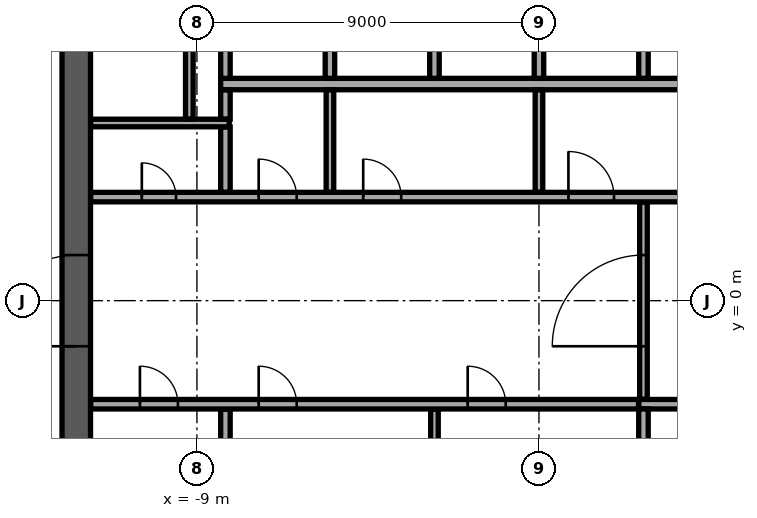
"""IFC4 building model, lengths in metres.
Left out: names, types, materials, properties, quantities, classifications, styles, units other than length and angle.
Written with IfcOpenShell. Run it as: python <this file> out.ifc"""

import sys

from ifc_helpers import new_model, si_unit, direction, frame, frame_2d, origin, place, context, subcontext, project, spatial, rectangle, extrude, element, fill, save


model = new_model("IFC4")
c1 = context("Model", 3, precision=1e-05, world=origin(), true_north=direction((0.0, 1.0)))
c2 = subcontext(c1, "Body", "Model", "MODEL_VIEW")
j1 = project(units=[si_unit("LENGTHUNIT", "METRE"), si_unit("PLANEANGLEUNIT", "RADIAN")], contexts=[c1])
p1 = place(None, origin())
s1 = spatial("IfcSite", under=j1, at=p1, CompositionType="ELEMENT")
p2 = place(p1, origin())
s2 = spatial("IfcBuilding", under=s1, at=p2, CompositionType="ELEMENT")
p3 = place(p2, frame((0.0, 0.0, 242.9)))
s3 = spatial("IfcBuildingStorey", under=s2, at=p3, CompositionType="ELEMENT", Elevation=242.9)
p4 = place(p3, frame((-12.175, -11.8, 0.0), z_axis=(0.0, 0.0, 1.0), x_axis=(0.0, 1.0, 0.0)))
e1 = element("IfcWall", 1, at=p4, inside=s3, PredefinedType="SHEAR", context=c2, shape_type="SweptSolid", body=[
    extrude(rectangle(XDim=23.6, YDim=0.75, at=frame_2d((11.8, 0.0))), origin(), (0.0, 0.0, 1.0), 3.64),
])
p5 = place(p4, frame((10.6, 0.0, 0.0)))
e2 = element("IfcOpeningElement", 2, at=p5, cuts=e1, PredefinedType="OPENING", context=c2, shape_type="SweptSolid", body=[
    extrude(rectangle(XDim=2.4, YDim=2.4, at=frame_2d((1.2, 1.2))), frame((0.0, 0.385, 0.0), z_axis=(0.0, -1.0, 0.0), x_axis=(1.0, 0.0, 0.0)), (0.0, 0.0, 1.0), 0.77),
])
p6 = place(p3, frame((-8.375, 5.7, 0.0), z_axis=(0.0, 0.0, 1.0), x_axis=(1.0, 0.0, 0.0)))
e3 = element("IfcWall", 3, at=p6, inside=s3, PredefinedType="SOLIDWALL", context=c2, shape_type="SweptSolid", body=[
    extrude(rectangle(XDim=16.75, YDim=0.3, at=frame_2d((8.375, 0.0))), origin(), (0.0, 0.0, 1.0), 3.64),
])
for number, where, z_axis, x_axis in (
    (4, (-8.25, 5.85, 0.0), (0.0, 0.0, 1.0), (0.0, 1.0, 0.0)),
    (5, (-5.5, 5.85, 0.0), (0.0, 0.0, 1.0), (0.0, 1.0, 0.0)),
    (6, (-2.75, 5.85, 0.0), (0.0, 0.0, 1.0), (0.0, 1.0, 0.0)),
    (7, (0.0, 5.85, 0.0), (0.0, 0.0, 1.0), (0.0, 1.0, 0.0)),
    (8, (2.75, 5.85, 0.0), (0.0, 0.0, 1.0), (0.0, 1.0, 0.0)),
):
    element("IfcWall", number, at=place(p3, frame(where, z_axis=z_axis, x_axis=x_axis)), inside=s3, PredefinedType="SOLIDWALL", context=c2, shape_type="SweptSolid", body=[
        extrude(rectangle(XDim=2.7, YDim=0.25, at=frame_2d((1.35, 0.0))), origin(), (0.0, 0.0, 1.0), 3.64),
    ])
p7 = place(p3, frame((2.625, -2.725, 0.0), z_axis=(0.0, 0.0, 1.0), x_axis=(1.0, 0.0, 0.0)))
e9 = element("IfcWall", 9, at=p7, inside=s3, PredefinedType="SOLIDWALL", context=c2, shape_type="SweptSolid", body=[
    extrude(rectangle(XDim=3.0, YDim=0.25, at=frame_2d((1.5, 0.0))), origin(), (0.0, 0.0, 1.0), 3.64),
])
p8 = place(p3, frame((2.75, -5.55, 0.0), z_axis=(0.0, 0.0, 1.0), x_axis=(0.0, 1.0, 0.0)))
e10 = element("IfcWall", 10, at=p8, inside=s3, PredefinedType="SOLIDWALL", context=c2, shape_type="SweptSolid", body=[
    extrude(rectangle(XDim=2.7, YDim=0.25, at=frame_2d((1.35, 0.0))), origin(), (0.0, 0.0, 1.0), 3.64),
])
p9 = place(p3, frame((-8.25, -5.545, 0.0), z_axis=(0.0, 0.0, 1.0), x_axis=(0.0, 1.0, 0.0)))
e11 = element("IfcWall", 11, at=p9, inside=s3, PredefinedType="PARTITIONING", context=c2, shape_type="SweptSolid", body=[
    extrude(rectangle(XDim=2.69, YDim=0.25, at=frame_2d((1.345, 0.0))), origin(), (0.0, 0.0, 1.0), 3.64),
])
p10 = place(p3, frame((-2.75, -5.545, 0.0), z_axis=(0.0, 0.0, 1.0), x_axis=(0.0, 1.0, 0.0)))
e12 = element("IfcWall", 12, at=p10, inside=s3, PredefinedType="PARTITIONING", context=c2, shape_type="SweptSolid", body=[
    extrude(rectangle(XDim=2.69, YDim=0.2, at=frame_2d((1.345, 0.0))), origin(), (0.0, 0.0, 1.0), 3.64),
])
p11 = place(p3, frame((-11.795, -2.725, 0.0), z_axis=(0.0, 0.0, 1.0), x_axis=(1.0, 0.0, 0.0)))
e13 = element("IfcWall", 13, at=p11, inside=s3, PredefinedType="PARTITIONING", context=c2, shape_type="SweptSolid", body=[
    extrude(rectangle(XDim=14.415, YDim=0.25, at=frame_2d((7.208, 0.0))), origin(), (0.0, 0.0, 1.0), 3.64),
])
p12 = place(p11, frame((1.295, 0.0, 0.0)))
e14 = element("IfcOpeningElement", 14, at=p12, cuts=e13, PredefinedType="OPENING", context=c2, shape_type="SweptSolid", body=[
    extrude(rectangle(XDim=1.0, YDim=2.1, at=frame_2d((0.5, 1.05))), frame((0.0, 0.135, 0.0), z_axis=(0.0, -1.0, 0.0), x_axis=(1.0, 0.0, 0.0)), (0.0, 0.0, 1.0), 0.27),
])
p13 = place(p11, frame((4.42, 0.0, 0.0)))
e15 = element("IfcOpeningElement", 15, at=p13, cuts=e13, PredefinedType="OPENING", context=c2, shape_type="SweptSolid", body=[
    extrude(rectangle(XDim=1.0, YDim=2.1, at=frame_2d((0.5, 1.05))), frame((0.0, 0.135, 0.0), z_axis=(0.0, -1.0, 0.0), x_axis=(1.0, 0.0, 0.0)), (0.0, 0.0, 1.0), 0.27),
])
p14 = place(p11, frame((9.92, 0.0, 0.0)))
e16 = element("IfcOpeningElement", 16, at=p14, cuts=e13, PredefinedType="OPENING", context=c2, shape_type="SweptSolid", body=[
    extrude(rectangle(XDim=1.0, YDim=2.1, at=frame_2d((0.5, 1.05))), frame((0.0, 0.135, 0.0), z_axis=(0.0, -1.0, 0.0), x_axis=(1.0, 0.0, 0.0)), (0.0, 0.0, 1.0), 0.27),
])
p15 = place(p3, frame((2.75, -2.595, 0.0), z_axis=(0.0, 0.0, 1.0), x_axis=(0.0, 1.0, 0.0)))
e17 = element("IfcWall", 17, at=p15, inside=s3, PredefinedType="PARTITIONING", context=c2, shape_type="SweptSolid", body=[
    extrude(rectangle(XDim=5.19, YDim=0.2, at=frame_2d((2.595, 0.0))), origin(), (0.0, 0.0, 1.0), 3.64),
])
p16 = place(p15, frame((1.395, 0.0, 0.0)))
e18 = element("IfcOpeningElement", 18, at=p16, cuts=e17, PredefinedType="OPENING", context=c2, shape_type="SweptSolid", body=[
    extrude(rectangle(XDim=2.4, YDim=2.4, at=frame_2d((1.2, 1.2))), frame((0.0, 0.11, 0.0), z_axis=(0.0, -1.0, 0.0), x_axis=(1.0, 0.0, 0.0)), (0.0, 0.0, 1.0), 0.22),
])
p17 = place(p3, frame((-11.795, 2.725, 0.0), z_axis=(0.0, 0.0, 1.0), x_axis=(1.0, 0.0, 0.0)))
e19 = element("IfcWall", 19, at=p17, inside=s3, PredefinedType="PARTITIONING", context=c2, shape_type="SweptSolid", body=[
    extrude(rectangle(XDim=23.59, YDim=0.25, at=frame_2d((11.795, 0.0))), origin(), (0.0, 0.0, 1.0), 3.64),
])
p18 = place(p17, frame((21.345, 0.0, 0.0)))
e20 = element("IfcOpeningElement", 20, at=p18, cuts=e19, PredefinedType="OPENING", context=c2, shape_type="SweptSolid", body=[
    extrude(rectangle(XDim=0.9, YDim=2.1, at=frame_2d((0.45, 1.05))), frame((0.0, 0.135, 0.0), z_axis=(0.0, -1.0, 0.0), x_axis=(1.0, 0.0, 0.0)), (0.0, 0.0, 1.0), 0.27),
])
p19 = place(p17, frame((1.345, 0.0, 0.0)))
e21 = element("IfcOpeningElement", 21, at=p19, cuts=e19, PredefinedType="OPENING", context=c2, shape_type="SweptSolid", body=[
    extrude(rectangle(XDim=0.9, YDim=2.1, at=frame_2d((0.45, 1.05))), frame((0.0, 0.135, 0.0), z_axis=(0.0, -1.0, 0.0), x_axis=(1.0, 0.0, 0.0)), (0.0, 0.0, 1.0), 0.27),
])
p20 = place(p17, frame((4.42, 0.0, 0.0)))
e22 = element("IfcOpeningElement", 22, at=p20, cuts=e19, PredefinedType="OPENING", context=c2, shape_type="SweptSolid", body=[
    extrude(rectangle(XDim=1.0, YDim=2.1, at=frame_2d((0.5, 1.05))), frame((0.0, 0.135, 0.0), z_axis=(0.0, -1.0, 0.0), x_axis=(1.0, 0.0, 0.0)), (0.0, 0.0, 1.0), 0.27),
])
p21 = place(p17, frame((7.17, 0.0, 0.0)))
e23 = element("IfcOpeningElement", 23, at=p21, cuts=e19, PredefinedType="OPENING", context=c2, shape_type="SweptSolid", body=[
    extrude(rectangle(XDim=1.0, YDim=2.1, at=frame_2d((0.5, 1.05))), frame((0.0, 0.135, 0.0), z_axis=(0.0, -1.0, 0.0), x_axis=(1.0, 0.0, 0.0)), (0.0, 0.0, 1.0), 0.27),
])
p22 = place(p17, frame((12.57, 0.0, 0.0)))
e24 = element("IfcOpeningElement", 24, at=p22, cuts=e19, PredefinedType="OPENING", context=c2, shape_type="SweptSolid", body=[
    extrude(rectangle(XDim=1.2, YDim=2.1, at=frame_2d((0.6, 1.05))), frame((0.0, 0.135, 0.0), z_axis=(0.0, -1.0, 0.0), x_axis=(1.0, 0.0, 0.0)), (0.0, 0.0, 1.0), 0.27),
])
p23 = place(p3, frame((-8.25, 2.855, 0.0), z_axis=(0.0, 0.0, 1.0), x_axis=(0.0, 1.0, 0.0)))
e25 = element("IfcWall", 25, at=p23, inside=s3, PredefinedType="PARTITIONING", context=c2, shape_type="SweptSolid", body=[
    extrude(rectangle(XDim=1.715, YDim=0.25, at=frame_2d((0.857, 0.0))), origin(), (0.0, 0.0, 1.0), 3.64),
])
for number, where, z_axis, x_axis in (
    (26, (-5.5, 2.855, 0.0), (0.0, 0.0, 1.0), (0.0, 1.0, 0.0)),
    (27, (0.0, 2.855, 0.0), (0.0, 0.0, 1.0), (0.0, 1.0, 0.0)),
):
    element("IfcWall", number, at=place(p3, frame(where, z_axis=z_axis, x_axis=x_axis)), inside=s3, PredefinedType="PARTITIONING", context=c2, shape_type="SweptSolid", body=[
        extrude(rectangle(XDim=2.69, YDim=0.2, at=frame_2d((1.345, 0.0))), origin(), (0.0, 0.0, 1.0), 3.64),
    ])
p24 = place(p3, frame((-11.795, 4.675, 0.0), z_axis=(0.0, 0.0, 1.0), x_axis=(1.0, 0.0, 0.0)))
e28 = element("IfcWall", 28, at=p24, inside=s3, PredefinedType="PARTITIONING", context=c2, shape_type="SweptSolid", body=[
    extrude(rectangle(XDim=3.645, YDim=0.2, at=frame_2d((1.823, 0.0))), origin(), (0.0, 0.0, 1.0), 3.64),
])
p25 = place(p3, frame((-9.2, 4.78, 0.0), z_axis=(0.0, 0.0, 1.0), x_axis=(0.0, 1.0, 0.0)))
e29 = element("IfcWall", 29, at=p25, inside=s3, PredefinedType="PARTITIONING", context=c2, shape_type="SweptSolid", body=[
    extrude(rectangle(XDim=7.015, YDim=0.2, at=frame_2d((3.507, 0.0))), origin(), (0.0, 0.0, 1.0), 3.64),
])
p26 = place(p25, frame((2.92, 0.0, 0.0)))
e30 = element("IfcOpeningElement", 30, at=p26, cuts=e29, PredefinedType="OPENING", context=c2, shape_type="SweptSolid", body=[
    extrude(rectangle(XDim=1.0, YDim=2.1, at=frame_2d((0.5, 1.05))), frame((0.0, 0.11, 0.0), z_axis=(0.0, -1.0, 0.0), x_axis=(1.0, 0.0, 0.0)), (0.0, 0.0, 1.0), 0.22),
])
p27 = place(p3, frame((-8.25, 4.78, 0.0), z_axis=(0.0, 0.0, 1.0), x_axis=(0.0, 1.0, 0.0)))
e31 = element("IfcWall", 31, at=p27, inside=s3, PredefinedType="PARTITIONING", context=c2, shape_type="SweptSolid", body=[
    extrude(rectangle(XDim=0.765, YDim=0.25, at=frame_2d((0.382, 0.0))), origin(), (0.0, 0.0, 1.0), 3.64),
])
p28 = place(p3, frame((-5.115, 33.491, 0.0), z_axis=(0.0, 0.0, 1.0), x_axis=(-0.57357740375, -0.819151366908, 0.0)))
e32 = element("IfcWall", 32, at=p28, inside=s3, PredefinedType="STANDARD", context=c2, shape_type="SweptSolid", body=[
    extrude(rectangle(XDim=48.843, YDim=0.6, at=frame_2d((24.422, 0.0))), origin(), (0.0, 0.0, 1.0), 3.64),
])
p29 = place(p28, frame((1.22, 0.0, 0.9)))
e33 = element("IfcOpeningElement", 33, at=p29, cuts=e32, PredefinedType="OPENING", context=c2, shape_type="SweptSolid", body=[
    extrude(rectangle(XDim=2.0, YDim=2.1, at=frame_2d((1.0, 1.05))), frame((0.0, 0.31, 0.0), z_axis=(0.0, -1.0, 0.0), x_axis=(1.0, 0.0, 0.0)), (0.0, 0.0, 1.0), 0.62),
])
p30 = place(p28, frame((5.66, 0.0, 0.9)))
e34 = element("IfcOpeningElement", 34, at=p30, cuts=e32, PredefinedType="OPENING", context=c2, shape_type="SweptSolid", body=[
    extrude(rectangle(XDim=2.0, YDim=2.1, at=frame_2d((1.0, 1.05))), frame((0.0, 0.31, 0.0), z_axis=(0.0, -1.0, 0.0), x_axis=(1.0, 0.0, 0.0)), (0.0, 0.0, 1.0), 0.62),
])
p31 = place(p28, frame((10.101, 0.0, 0.9)))
e35 = element("IfcOpeningElement", 35, at=p31, cuts=e32, PredefinedType="OPENING", context=c2, shape_type="SweptSolid", body=[
    extrude(rectangle(XDim=2.0, YDim=2.1, at=frame_2d((1.0, 1.05))), frame((0.0, 0.31, 0.0), z_axis=(0.0, -1.0, 0.0), x_axis=(1.0, 0.0, 0.0)), (0.0, 0.0, 1.0), 0.62),
])
p32 = place(p28, frame((14.541, 0.0, 0.9)))
e36 = element("IfcOpeningElement", 36, at=p32, cuts=e32, PredefinedType="OPENING", context=c2, shape_type="SweptSolid", body=[
    extrude(rectangle(XDim=2.0, YDim=2.1, at=frame_2d((1.0, 1.05))), frame((0.0, 0.31, 0.0), z_axis=(0.0, -1.0, 0.0), x_axis=(1.0, 0.0, 0.0)), (0.0, 0.0, 1.0), 0.62),
])
p33 = place(p28, frame((18.981, 0.0, 0.9)))
e37 = element("IfcOpeningElement", 37, at=p33, cuts=e32, PredefinedType="OPENING", context=c2, shape_type="SweptSolid", body=[
    extrude(rectangle(XDim=2.0, YDim=2.1, at=frame_2d((1.0, 1.05))), frame((0.0, 0.31, 0.0), z_axis=(0.0, -1.0, 0.0), x_axis=(1.0, 0.0, 0.0)), (0.0, 0.0, 1.0), 0.62),
])
p34 = place(p28, frame((23.422, 0.0, 0.9)))
e38 = element("IfcOpeningElement", 38, at=p34, cuts=e32, PredefinedType="OPENING", context=c2, shape_type="SweptSolid", body=[
    extrude(rectangle(XDim=2.0, YDim=2.1, at=frame_2d((1.0, 1.05))), frame((0.0, 0.31, 0.0), z_axis=(0.0, -1.0, 0.0), x_axis=(1.0, 0.0, 0.0)), (0.0, 0.0, 1.0), 0.62),
])
p35 = place(p28, frame((27.862, 0.0, 0.9)))
e39 = element("IfcOpeningElement", 39, at=p35, cuts=e32, PredefinedType="OPENING", context=c2, shape_type="SweptSolid", body=[
    extrude(rectangle(XDim=2.0, YDim=2.1, at=frame_2d((1.0, 1.05))), frame((0.0, 0.31, 0.0), z_axis=(0.0, -1.0, 0.0), x_axis=(1.0, 0.0, 0.0)), (0.0, 0.0, 1.0), 0.62),
])
p36 = place(p28, frame((32.302, 0.0, 0.9)))
e40 = element("IfcOpeningElement", 40, at=p36, cuts=e32, PredefinedType="OPENING", context=c2, shape_type="SweptSolid", body=[
    extrude(rectangle(XDim=2.0, YDim=2.1, at=frame_2d((1.0, 1.05))), frame((0.0, 0.31, 0.0), z_axis=(0.0, -1.0, 0.0), x_axis=(1.0, 0.0, 0.0)), (0.0, 0.0, 1.0), 0.62),
])
p37 = place(p28, frame((36.742, 0.0, 0.9)))
e41 = element("IfcOpeningElement", 41, at=p37, cuts=e32, PredefinedType="OPENING", context=c2, shape_type="SweptSolid", body=[
    extrude(rectangle(XDim=2.0, YDim=2.1, at=frame_2d((1.0, 1.05))), frame((0.0, 0.31, 0.0), z_axis=(0.0, -1.0, 0.0), x_axis=(1.0, 0.0, 0.0)), (0.0, 0.0, 1.0), 0.62),
])
p38 = place(p28, frame((41.183, 0.0, 0.9)))
e42 = element("IfcOpeningElement", 42, at=p38, cuts=e32, PredefinedType="OPENING", context=c2, shape_type="SweptSolid", body=[
    extrude(rectangle(XDim=2.0, YDim=2.1, at=frame_2d((1.0, 1.05))), frame((0.0, 0.31, 0.0), z_axis=(0.0, -1.0, 0.0), x_axis=(1.0, 0.0, 0.0)), (0.0, 0.0, 1.0), 0.62),
])
p39 = place(p28, frame((45.623, 0.0, 0.9)))
e43 = element("IfcOpeningElement", 43, at=p39, cuts=e32, PredefinedType="OPENING", context=c2, shape_type="SweptSolid", body=[
    extrude(rectangle(XDim=2.0, YDim=2.1, at=frame_2d((1.0, 1.05))), frame((0.0, 0.31, 0.0), z_axis=(0.0, -1.0, 0.0), x_axis=(1.0, 0.0, 0.0)), (0.0, 0.0, 1.0), 0.62),
])
p40 = place(p5, origin())
e44 = element("IfcDoor", 44, at=p40, inside=s3, OperationType="SINGLE_SWING_LEFT", PredefinedType="DOOR", context=c2, shape_type="SweptSolid", body=[
    extrude(rectangle(XDim=2.4, YDim=2.4, at=frame_2d((1.2, 1.2))), frame((0.0, 0.025, 0.0), z_axis=(0.0, -1.0, 0.0), x_axis=(1.0, 0.0, 0.0)), (0.0, 0.0, 1.0), 0.05),
])
fill(e2, e44)
p41 = place(p12, origin())
e45 = element("IfcDoor", 45, at=p41, inside=s3, OperationType="SINGLE_SWING_RIGHT", PredefinedType="DOOR", context=c2, shape_type="SweptSolid", body=[
    extrude(rectangle(XDim=1.0, YDim=2.1, at=frame_2d((0.5, 1.05))), frame((0.0, 0.025, 0.0), z_axis=(0.0, -1.0, 0.0), x_axis=(1.0, 0.0, 0.0)), (0.0, 0.0, 1.0), 0.05),
])
fill(e14, e45)
p42 = place(p19, origin())
e46 = element("IfcDoor", 46, at=p42, inside=s3, OperationType="SINGLE_SWING_RIGHT", PredefinedType="DOOR", context=c2, shape_type="SweptSolid", body=[
    extrude(rectangle(XDim=0.9, YDim=2.1, at=frame_2d((0.45, 1.05))), frame((0.0, 0.025, 0.0), z_axis=(0.0, -1.0, 0.0), x_axis=(1.0, 0.0, 0.0)), (0.0, 0.0, 1.0), 0.05),
])
fill(e21, e46)
p43 = place(p20, origin())
e47 = element("IfcDoor", 47, at=p43, inside=s3, OperationType="SINGLE_SWING_RIGHT", PredefinedType="DOOR", context=c2, shape_type="SweptSolid", body=[
    extrude(rectangle(XDim=1.0, YDim=2.1, at=frame_2d((0.5, 1.05))), frame((0.0, 0.025, 0.0), z_axis=(0.0, -1.0, 0.0), x_axis=(1.0, 0.0, 0.0)), (0.0, 0.0, 1.0), 0.05),
])
fill(e22, e47)
p44 = place(p21, origin())
e48 = element("IfcDoor", 48, at=p44, inside=s3, OperationType="SINGLE_SWING_RIGHT", PredefinedType="DOOR", context=c2, shape_type="SweptSolid", body=[
    extrude(rectangle(XDim=1.0, YDim=2.1, at=frame_2d((0.5, 1.05))), frame((0.0, 0.025, 0.0), z_axis=(0.0, -1.0, 0.0), x_axis=(1.0, 0.0, 0.0)), (0.0, 0.0, 1.0), 0.05),
])
fill(e23, e48)
p45 = place(p22, origin())
e49 = element("IfcDoor", 49, at=p45, inside=s3, OperationType="SINGLE_SWING_LEFT", PredefinedType="DOOR", context=c2, shape_type="SweptSolid", body=[
    extrude(rectangle(XDim=1.2, YDim=2.1, at=frame_2d((0.6, 1.05))), frame((0.0, 0.025, 0.0), z_axis=(0.0, -1.0, 0.0), x_axis=(1.0, 0.0, 0.0)), (0.0, 0.0, 1.0), 0.05),
])
fill(e24, e49)
p46 = place(p13, origin())
e50 = element("IfcDoor", 50, at=p46, inside=s3, OperationType="SINGLE_SWING_RIGHT", PredefinedType="DOOR", context=c2, shape_type="SweptSolid", body=[
    extrude(rectangle(XDim=1.0, YDim=2.1, at=frame_2d((0.5, 1.05))), frame((0.0, 0.025, 0.0), z_axis=(0.0, -1.0, 0.0), x_axis=(1.0, 0.0, 0.0)), (0.0, 0.0, 1.0), 0.05),
])
fill(e15, e50)
p47 = place(p14, origin())
e51 = element("IfcDoor", 51, at=p47, inside=s3, OperationType="SINGLE_SWING_RIGHT", PredefinedType="DOOR", context=c2, shape_type="SweptSolid", body=[
    extrude(rectangle(XDim=1.0, YDim=2.1, at=frame_2d((0.5, 1.05))), frame((0.0, 0.025, 0.0), z_axis=(0.0, -1.0, 0.0), x_axis=(1.0, 0.0, 0.0)), (0.0, 0.0, 1.0), 0.05),
])
fill(e16, e51)
p48 = place(p16, origin())
e52 = element("IfcDoor", 52, at=p48, inside=s3, OperationType="DOUBLE_DOOR_DOUBLE_SWING", PredefinedType="DOOR", context=c2, shape_type="SweptSolid", body=[
    extrude(rectangle(XDim=2.4, YDim=2.4, at=frame_2d((1.2, 1.2))), frame((0.0, 0.025, 0.0), z_axis=(0.0, -1.0, 0.0), x_axis=(1.0, 0.0, 0.0)), (0.0, 0.0, 1.0), 0.05),
])
fill(e18, e52)
save(model, sys.argv[1])
